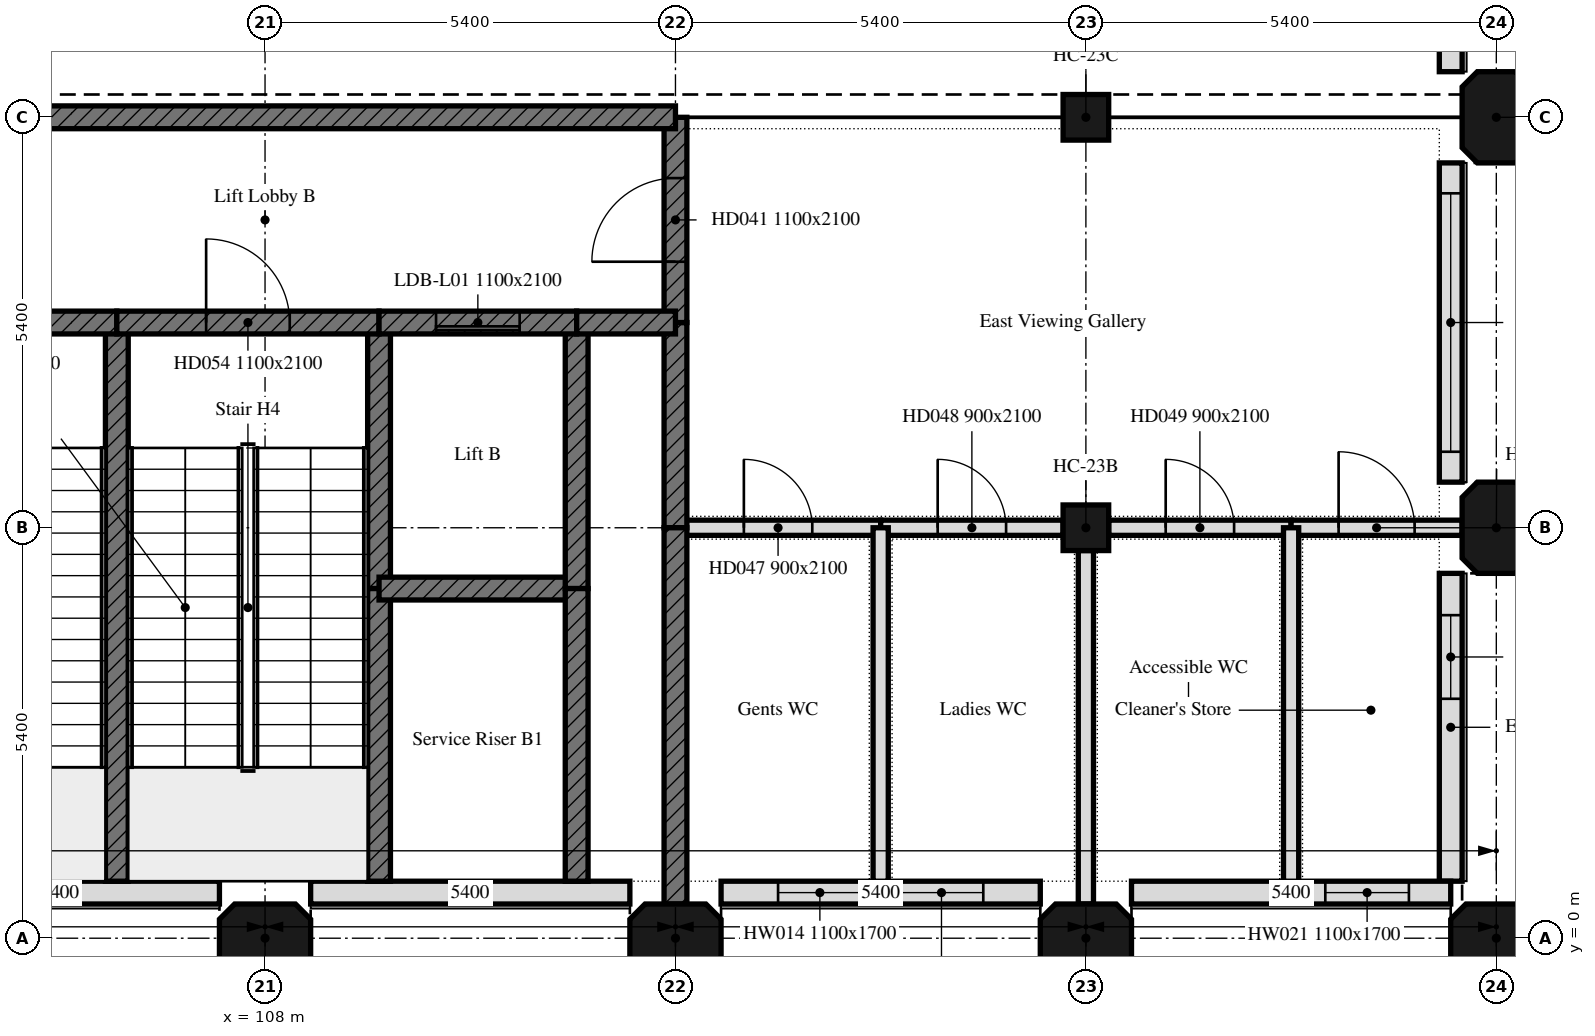
"""IFC4 building model, lengths in metres.
Left out: names, types, materials, properties, quantities, classifications, styles, units other than length and angle.
Written with IfcOpenShell. Run it as: python <this file> out.ifc"""

import sys

from ifc_helpers import new_model, si_unit, direction, frame, frame_2d, origin, origin_2d, place, context, subcontext, project, spatial, polyline, rectangle, outline, extrude, element, fill, save


model = new_model("IFC4")
c1 = context("Model", 3, precision=1e-05, world=origin(), true_north=direction((0.0, 1.0)))
c2 = subcontext(c1, "Body", "Model", "MODEL_VIEW")
j1 = project(units=[si_unit("LENGTHUNIT", "METRE"), si_unit("PLANEANGLEUNIT", "RADIAN")], contexts=[c1])
p1 = place(None, origin())
s1 = spatial("IfcSite", under=j1, at=p1, CompositionType="ELEMENT")
p2 = place(p1, origin())
s2 = spatial("IfcBuilding", under=s1, at=p2, CompositionType="ELEMENT")
p3 = place(p2, frame((0.0, 0.0, 8.4)))
s3 = spatial("IfcBuildingStorey", under=s2, at=p3, CompositionType="ELEMENT", Elevation=8.4)
for number, where, z_axis, x_axis in (
    (1, (108.0, 0.0, 0.0), (0.0, 0.0, 1.0), (1.0, 0.0, 0.0)),
    (2, (113.4, 0.0, 0.0), (0.0, 0.0, 1.0), (1.0, 0.0, 0.0)),
    (3, (118.8, 0.0, 0.0), (0.0, 0.0, 1.0), (1.0, 0.0, 0.0)),
):
    element("IfcColumn", number, at=place(p3, frame(where, z_axis=z_axis, x_axis=x_axis)), inside=s3, PredefinedType="COLUMN", context=c2, shape_type="SweptSolid", body=[
        extrude(outline(polyline([(-0.4, -0.45), (0.4, -0.45), (0.6, -0.25), (0.6, 0.25), (0.4, 0.45), (-0.4, 0.45), (-0.6, 0.25), (-0.6, -0.25), (-0.4, -0.45)])), origin(), (0.0, 0.0, 1.0), 5.7),
    ])
for number, where, z_axis, x_axis in (
    (4, (118.8, 5.4, 0.0), (0.0, 0.0, 1.0), (1.0, 0.0, 0.0)),
    (5, (118.8, 10.8, 0.0), (0.0, 0.0, 1.0), (1.0, 0.0, 0.0)),
):
    element("IfcColumn", number, at=place(p3, frame(where, z_axis=z_axis, x_axis=x_axis)), inside=s3, PredefinedType="COLUMN", context=c2, shape_type="SweptSolid", body=[
        extrude(rectangle(XDim=0.6, YDim=0.6, at=origin_2d()), origin(), (0.0, 0.0, 1.0), 5.7),
    ])
for number, where, z_axis, x_axis in (
    (6, (124.2, 0.0, 0.0), (0.0, 0.0, 1.0), (1.0, 0.0, 0.0)),
    (7, (124.2, 5.4, 0.0), (0.0, 0.0, 1.0), (0.0, 1.0, 0.0)),
    (8, (124.2, 10.8, 0.0), (0.0, 0.0, 1.0), (0.0, 1.0, 0.0)),
):
    element("IfcColumn", number, at=place(p3, frame(where, z_axis=z_axis, x_axis=x_axis)), inside=s3, PredefinedType="COLUMN", context=c2, shape_type="SweptSolid", body=[
        extrude(outline(polyline([(-0.4, -0.45), (0.4, -0.45), (0.6, -0.25), (0.6, 0.25), (0.4, 0.45), (-0.4, 0.45), (-0.6, 0.25), (-0.6, -0.25), (-0.4, -0.45)])), origin(), (0.0, 0.0, 1.0), 5.7),
    ])
for number, where, z_axis, x_axis in (
    (9, (103.2, 0.6, 0.0), (0.0, 0.0, 1.0), (1.0, 0.0, 0.0)),
    (10, (108.6, 0.6, 0.0), (0.0, 0.0, 1.0), (1.0, 0.0, 0.0)),
):
    element("IfcWall", number, at=place(p3, frame(where, z_axis=z_axis, x_axis=x_axis)), inside=s3, PredefinedType="SOLIDWALL", context=c2, shape_type="SweptSolid", body=[
        extrude(rectangle(XDim=4.2, YDim=0.3, at=frame_2d((2.1, 0.0))), origin(), (0.0, 0.0, 1.0), 5.7),
    ])
p4 = place(p3, frame((114.0, 0.6, 0.0), z_axis=(0.0, 0.0, 1.0), x_axis=(1.0, 0.0, 0.0)))
e11 = element("IfcWall", 11, at=p4, inside=s3, PredefinedType="SOLIDWALL", context=c2, shape_type="SweptSolid", body=[
    extrude(rectangle(XDim=4.2, YDim=0.3, at=frame_2d((2.1, 0.0))), origin(), (0.0, 0.0, 1.0), 5.7),
])
p5 = place(p4, frame((0.75, 0.0, 0.9)))
e12 = element("IfcOpeningElement", 12, at=p5, cuts=e11, PredefinedType="OPENING", context=c2, shape_type="SweptSolid", body=[
    extrude(rectangle(XDim=1.1, YDim=1.7, at=frame_2d((0.55, 0.85))), frame((0.0, 0.15, 0.0), z_axis=(0.0, -1.0, 0.0), x_axis=(1.0, 0.0, 0.0)), (0.0, 0.0, 1.0), 0.3),
])
p6 = place(p4, frame((2.35, 0.0, 0.9)))
e13 = element("IfcOpeningElement", 13, at=p6, cuts=e11, PredefinedType="OPENING", context=c2, shape_type="SweptSolid", body=[
    extrude(rectangle(XDim=1.1, YDim=1.7, at=frame_2d((0.55, 0.85))), frame((0.0, 0.15, 0.0), z_axis=(0.0, -1.0, 0.0), x_axis=(1.0, 0.0, 0.0)), (0.0, 0.0, 1.0), 0.3),
])
p7 = place(p3, frame((119.4, 0.6, 0.0), z_axis=(0.0, 0.0, 1.0), x_axis=(1.0, 0.0, 0.0)))
e14 = element("IfcWall", 14, at=p7, inside=s3, PredefinedType="SOLIDWALL", context=c2, shape_type="SweptSolid", body=[
    extrude(rectangle(XDim=4.2, YDim=0.3, at=frame_2d((2.1, 0.0))), origin(), (0.0, 0.0, 1.0), 5.7),
])
p8 = place(p7, frame((2.55, 0.0, 0.9)))
e15 = element("IfcOpeningElement", 15, at=p8, cuts=e14, PredefinedType="OPENING", context=c2, shape_type="SweptSolid", body=[
    extrude(rectangle(XDim=1.1, YDim=1.7, at=frame_2d((0.55, 0.85))), frame((0.0, 0.15, 0.0), z_axis=(0.0, -1.0, 0.0), x_axis=(1.0, 0.0, 0.0)), (0.0, 0.0, 1.0), 0.3),
])
p9 = place(p3, frame((123.6, 0.75, 0.0), z_axis=(0.0, 0.0, 1.0), x_axis=(0.0, 1.0, 0.0)))
e16 = element("IfcWall", 16, at=p9, inside=s3, PredefinedType="SOLIDWALL", context=c2, shape_type="SweptSolid", body=[
    extrude(rectangle(XDim=4.05, YDim=0.3, at=frame_2d((2.025, 0.0))), origin(), (0.0, 0.0, 1.0), 5.7),
])
p10 = place(p9, frame((2.4, 0.0, 0.9)))
e17 = element("IfcOpeningElement", 17, at=p10, cuts=e16, PredefinedType="OPENING", context=c2, shape_type="SweptSolid", body=[
    extrude(rectangle(XDim=1.1, YDim=1.7, at=frame_2d((0.55, 0.85))), frame((0.0, 0.15, 0.0), z_axis=(0.0, -1.0, 0.0), x_axis=(1.0, 0.0, 0.0)), (0.0, 0.0, 1.0), 0.3),
])
p11 = place(p3, frame((123.6, 6.0, 0.0), z_axis=(0.0, 0.0, 1.0), x_axis=(0.0, 1.0, 0.0)))
e18 = element("IfcWall", 18, at=p11, inside=s3, PredefinedType="SOLIDWALL", context=c2, shape_type="SweptSolid", body=[
    extrude(rectangle(XDim=4.2, YDim=0.3, at=frame_2d((2.1, 0.0))), origin(), (0.0, 0.0, 1.0), 5.7),
])
p12 = place(p11, frame((0.4, 0.0, 0.9)))
e19 = element("IfcOpeningElement", 19, at=p12, cuts=e18, PredefinedType="OPENING", context=c2, shape_type="SweptSolid", body=[
    extrude(rectangle(XDim=3.4, YDim=1.7, at=frame_2d((1.7, 0.85))), frame((0.0, 0.15, 0.0), z_axis=(0.0, -1.0, 0.0), x_axis=(1.0, 0.0, 0.0)), (0.0, 0.0, 1.0), 0.3),
])
p13 = place(p3, frame((123.6, 11.4, 0.0), z_axis=(0.0, 0.0, 1.0), x_axis=(0.0, 1.0, 0.0)))
e20 = element("IfcWall", 20, at=p13, inside=s3, PredefinedType="SOLIDWALL", context=c2, shape_type="SweptSolid", body=[
    extrude(rectangle(XDim=4.2, YDim=0.3, at=frame_2d((2.1, 0.0))), origin(), (0.0, 0.0, 1.0), 6.0),
])
p14 = place(p3, frame((113.4, 5.4, 0.0), z_axis=(0.0, 0.0, 1.0), x_axis=(1.0, 0.0, 0.0)))
e21 = element("IfcWall", 21, at=p14, inside=s3, PredefinedType="PARTITIONING", context=c2, shape_type="SweptSolid", body=[
    extrude(rectangle(XDim=2.7, YDim=0.2, at=frame_2d((1.35, 0.0))), origin(), (0.0, 0.0, 1.0), 5.7),
])
p15 = place(p14, frame((0.9, 0.0, 0.0)))
e22 = element("IfcOpeningElement", 22, at=p15, cuts=e21, PredefinedType="OPENING", context=c2, shape_type="SweptSolid", body=[
    extrude(rectangle(XDim=0.9, YDim=2.1, at=frame_2d((0.45, 1.05))), frame((0.0, 0.1, 0.0), z_axis=(0.0, -1.0, 0.0), x_axis=(1.0, 0.0, 0.0)), (0.0, 0.0, 1.0), 0.2),
])
p16 = place(p3, frame((116.1, 5.4, 0.0), z_axis=(0.0, 0.0, 1.0), x_axis=(1.0, 0.0, 0.0)))
e23 = element("IfcWall", 23, at=p16, inside=s3, PredefinedType="PARTITIONING", context=c2, shape_type="SweptSolid", body=[
    extrude(rectangle(XDim=2.4, YDim=0.2, at=frame_2d((1.2, 0.0))), origin(), (0.0, 0.0, 1.0), 5.7),
])
p17 = place(p16, frame((0.75, 0.0, 0.0)))
e24 = element("IfcOpeningElement", 24, at=p17, cuts=e23, PredefinedType="OPENING", context=c2, shape_type="SweptSolid", body=[
    extrude(rectangle(XDim=0.9, YDim=2.1, at=frame_2d((0.45, 1.05))), frame((0.0, 0.1, 0.0), z_axis=(0.0, -1.0, 0.0), x_axis=(1.0, 0.0, 0.0)), (0.0, 0.0, 1.0), 0.2),
])
p18 = place(p3, frame((119.1, 5.4, 0.0), z_axis=(0.0, 0.0, 1.0), x_axis=(1.0, 0.0, 0.0)))
e25 = element("IfcWall", 25, at=p18, inside=s3, PredefinedType="PARTITIONING", context=c2, shape_type="SweptSolid", body=[
    extrude(rectangle(XDim=2.4, YDim=0.2, at=frame_2d((1.2, 0.0))), origin(), (0.0, 0.0, 1.0), 5.7),
])
p19 = place(p18, frame((0.75, 0.0, 0.0)))
e26 = element("IfcOpeningElement", 26, at=p19, cuts=e25, PredefinedType="OPENING", context=c2, shape_type="SweptSolid", body=[
    extrude(rectangle(XDim=0.9, YDim=2.1, at=frame_2d((0.45, 1.05))), frame((0.0, 0.1, 0.0), z_axis=(0.0, -1.0, 0.0), x_axis=(1.0, 0.0, 0.0)), (0.0, 0.0, 1.0), 0.2),
])
p20 = place(p3, frame((121.5, 5.4, 0.0), z_axis=(0.0, 0.0, 1.0), x_axis=(1.0, 0.0, 0.0)))
e27 = element("IfcWall", 27, at=p20, inside=s3, PredefinedType="PARTITIONING", context=c2, shape_type="SweptSolid", body=[
    extrude(rectangle(XDim=2.25, YDim=0.2, at=frame_2d((1.125, 0.0))), origin(), (0.0, 0.0, 1.0), 5.7),
])
p21 = place(p20, frame((0.625, 0.0, 0.0)))
e28 = element("IfcOpeningElement", 28, at=p21, cuts=e27, PredefinedType="OPENING", context=c2, shape_type="SweptSolid", body=[
    extrude(rectangle(XDim=1.0, YDim=2.1, at=frame_2d((0.5, 1.05))), frame((0.0, 0.1, 0.0), z_axis=(0.0, -1.0, 0.0), x_axis=(1.0, 0.0, 0.0)), (0.0, 0.0, 1.0), 0.2),
])
p22 = place(p3, frame((113.4, 5.4, 0.0), z_axis=(0.0, 0.0, 1.0), x_axis=(0.0, 1.0, 0.0)))
e29 = element("IfcWall", 29, at=p22, inside=s3, PredefinedType="SHEAR", context=c2, shape_type="SweptSolid", body=[
    extrude(rectangle(XDim=2.7, YDim=0.3, at=frame_2d((1.35, 0.0))), origin(), (0.0, 0.0, 1.0), 5.7),
])
p23 = place(p3, frame((113.4, 8.1, 0.0), z_axis=(0.0, 0.0, 1.0), x_axis=(0.0, 1.0, 0.0)))
e30 = element("IfcWall", 30, at=p23, inside=s3, PredefinedType="SHEAR", context=c2, shape_type="SweptSolid", body=[
    extrude(rectangle(XDim=2.7, YDim=0.3, at=frame_2d((1.35, 0.0))), origin(), (0.0, 0.0, 1.0), 5.7),
])
p24 = place(p23, frame((0.8, 0.0, 0.0)))
e31 = element("IfcOpeningElement", 31, at=p24, cuts=e30, PredefinedType="OPENING", context=c2, shape_type="SweptSolid", body=[
    extrude(rectangle(XDim=1.1, YDim=2.1, at=frame_2d((0.55, 1.05))), frame((0.0, 0.15, 0.0), z_axis=(0.0, -1.0, 0.0), x_axis=(1.0, 0.0, 0.0)), (0.0, 0.0, 1.0), 0.3),
])
p25 = place(p3, frame((116.1, 0.75, 0.0), z_axis=(0.0, 0.0, 1.0), x_axis=(0.0, 1.0, 0.0)))
e32 = element("IfcWall", 32, at=p25, inside=s3, PredefinedType="PARTITIONING", context=c2, shape_type="SweptSolid", body=[
    extrude(rectangle(XDim=4.65, YDim=0.2, at=frame_2d((2.325, 0.0))), origin(), (0.0, 0.0, 1.0), 5.7),
])
p26 = place(p3, frame((113.4, 0.45, 0.0), z_axis=(0.0, 0.0, 1.0), x_axis=(0.0, 1.0, 0.0)))
e33 = element("IfcWall", 33, at=p26, inside=s3, PredefinedType="SHEAR", context=c2, shape_type="SweptSolid", body=[
    extrude(rectangle(XDim=4.95, YDim=0.3, at=frame_2d((2.475, 0.0))), origin(), (0.0, 0.0, 1.0), 5.7),
])
p27 = place(p3, frame((118.8, 0.45, 0.0), z_axis=(0.0, 0.0, 1.0), x_axis=(0.0, 1.0, 0.0)))
e34 = element("IfcWall", 34, at=p27, inside=s3, PredefinedType="PARTITIONING", context=c2, shape_type="SweptSolid", body=[
    extrude(rectangle(XDim=4.65, YDim=0.2, at=frame_2d((2.325, 0.0))), origin(), (0.0, 0.0, 1.0), 5.7),
])
p28 = place(p3, frame((121.5, 0.75, 0.0), z_axis=(0.0, 0.0, 1.0), x_axis=(0.0, 1.0, 0.0)))
e35 = element("IfcWall", 35, at=p28, inside=s3, PredefinedType="PARTITIONING", context=c2, shape_type="SweptSolid", body=[
    extrude(rectangle(XDim=4.65, YDim=0.2, at=frame_2d((2.325, 0.0))), origin(), (0.0, 0.0, 1.0), 5.7),
])
p29 = place(p3, frame((106.05, 0.75, 0.0), z_axis=(0.0, 0.0, 1.0), x_axis=(0.0, 1.0, 0.0)))
e36 = element("IfcWall", 36, at=p29, inside=s3, PredefinedType="SHEAR", context=c2, shape_type="SweptSolid", body=[
    extrude(rectangle(XDim=7.35, YDim=0.3, at=frame_2d((3.675, 0.0))), origin(), (0.0, 0.0, 1.0), 5.7),
])
p30 = place(p3, frame((102.6, 8.1, 0.0), z_axis=(0.0, 0.0, 1.0), x_axis=(1.0, 0.0, 0.0)))
e37 = element("IfcWall", 37, at=p30, inside=s3, PredefinedType="SHEAR", context=c2, shape_type="SweptSolid", body=[
    extrude(rectangle(XDim=3.45, YDim=0.3, at=frame_2d((1.725, 0.0))), origin(), (0.0, 0.0, 1.0), 5.7),
])
p31 = place(p30, frame((1.175, 0.0, 0.0)))
e38 = element("IfcOpeningElement", 38, at=p31, cuts=e37, PredefinedType="OPENING", context=c2, shape_type="SweptSolid", body=[
    extrude(rectangle(XDim=1.1, YDim=2.1, at=frame_2d((0.55, 1.05))), frame((0.0, 0.15, 0.0), z_axis=(0.0, -1.0, 0.0), x_axis=(1.0, 0.0, 0.0)), (0.0, 0.0, 1.0), 0.3),
])
p32 = place(p3, frame((109.5, 4.6, 0.0), z_axis=(0.0, 0.0, 1.0), x_axis=(0.0, 1.0, 0.0)))
e39 = element("IfcWall", 39, at=p32, inside=s3, PredefinedType="SHEAR", context=c2, shape_type="SweptSolid", body=[
    extrude(rectangle(XDim=3.5, YDim=0.3, at=frame_2d((1.75, 0.0))), origin(), (0.0, 0.0, 1.0), 5.7),
])
p33 = place(p3, frame((109.5, 0.75, 0.0), z_axis=(0.0, 0.0, 1.0), x_axis=(0.0, 1.0, 0.0)))
e40 = element("IfcWall", 40, at=p33, inside=s3, PredefinedType="SHEAR", context=c2, shape_type="SweptSolid", body=[
    extrude(rectangle(XDim=3.85, YDim=0.3, at=frame_2d((1.925, 0.0))), origin(), (0.0, 0.0, 1.0), 5.7),
])
p34 = place(p3, frame((106.05, 8.1, 0.0), z_axis=(0.0, 0.0, 1.0), x_axis=(1.0, 0.0, 0.0)))
e41 = element("IfcWall", 41, at=p34, inside=s3, PredefinedType="SHEAR", context=c2, shape_type="SweptSolid", body=[
    extrude(rectangle(XDim=3.45, YDim=0.3, at=frame_2d((1.725, 0.0))), origin(), (0.0, 0.0, 1.0), 5.7),
])
p35 = place(p34, frame((1.175, 0.0, 0.0)))
e42 = element("IfcOpeningElement", 42, at=p35, cuts=e41, PredefinedType="OPENING", context=c2, shape_type="SweptSolid", body=[
    extrude(rectangle(XDim=1.1, YDim=2.1, at=frame_2d((0.55, 1.05))), frame((0.0, 0.15, 0.0), z_axis=(0.0, -1.0, 0.0), x_axis=(1.0, 0.0, 0.0)), (0.0, 0.0, 1.0), 0.3),
])
p36 = place(p3, frame((109.5, 4.6, 0.0), z_axis=(0.0, 0.0, 1.0), x_axis=(1.0, 0.0, 0.0)))
e43 = element("IfcWall", 43, at=p36, inside=s3, PredefinedType="SHEAR", context=c2, shape_type="SweptSolid", body=[
    extrude(rectangle(XDim=2.6, YDim=0.3, at=frame_2d((1.3, 0.0))), origin(), (0.0, 0.0, 1.0), 5.7),
])
p37 = place(p3, frame((112.1, 4.6, 0.0), z_axis=(0.0, 0.0, 1.0), x_axis=(0.0, 1.0, 0.0)))
e44 = element("IfcWall", 44, at=p37, inside=s3, PredefinedType="SHEAR", context=c2, shape_type="SweptSolid", body=[
    extrude(rectangle(XDim=3.5, YDim=0.3, at=frame_2d((1.75, 0.0))), origin(), (0.0, 0.0, 1.0), 5.7),
])
p38 = place(p3, frame((109.5, 8.1, 0.0), z_axis=(0.0, 0.0, 1.0), x_axis=(1.0, 0.0, 0.0)))
e45 = element("IfcWall", 45, at=p38, inside=s3, PredefinedType="SHEAR", context=c2, shape_type="SweptSolid", body=[
    extrude(rectangle(XDim=2.6, YDim=0.3, at=frame_2d((1.3, 0.0))), origin(), (0.0, 0.0, 1.0), 5.7),
])
p39 = place(p38, frame((0.75, 0.0, 0.0)))
e46 = element("IfcOpeningElement", 46, at=p39, cuts=e45, PredefinedType="OPENING", context=c2, shape_type="SweptSolid", body=[
    extrude(rectangle(XDim=1.1, YDim=2.1, at=frame_2d((0.55, 1.05))), frame((0.0, 0.15, 0.0), z_axis=(0.0, -1.0, 0.0), x_axis=(1.0, 0.0, 0.0)), (0.0, 0.0, 1.0), 0.3),
])
p40 = place(p3, frame((112.1, 0.75, 0.0), z_axis=(0.0, 0.0, 1.0), x_axis=(0.0, 1.0, 0.0)))
e47 = element("IfcWall", 47, at=p40, inside=s3, PredefinedType="SHEAR", context=c2, shape_type="SweptSolid", body=[
    extrude(rectangle(XDim=3.85, YDim=0.3, at=frame_2d((1.925, 0.0))), origin(), (0.0, 0.0, 1.0), 5.7),
])
p41 = place(p3, frame((112.1, 8.1, 0.0), z_axis=(0.0, 0.0, 1.0), x_axis=(1.0, 0.0, 0.0)))
e48 = element("IfcWall", 48, at=p41, inside=s3, PredefinedType="SHEAR", context=c2, shape_type="SweptSolid", body=[
    extrude(rectangle(XDim=1.3, YDim=0.3, at=frame_2d((0.65, 0.0))), origin(), (0.0, 0.0, 1.0), 5.7),
])
p42 = place(p3, frame((102.6, 10.8, 0.0), z_axis=(0.0, 0.0, 1.0), x_axis=(1.0, 0.0, 0.0)))
e49 = element("IfcWall", 49, at=p42, inside=s3, PredefinedType="SHEAR", context=c2, shape_type="SweptSolid", body=[
    extrude(rectangle(XDim=10.8, YDim=0.3, at=frame_2d((5.4, 0.0))), origin(), (0.0, 0.0, 1.0), 5.7),
])
p43 = place(p5, origin())
e50 = element("IfcWindow", 50, at=p43, inside=s3, PartitioningType="SINGLE_PANEL", PredefinedType="WINDOW", context=c2, shape_type="SweptSolid", body=[
    extrude(rectangle(XDim=1.1, YDim=1.7, at=frame_2d((0.55, 0.85))), frame((0.0, 0.03, 0.0), z_axis=(0.0, -1.0, 0.0), x_axis=(1.0, 0.0, 0.0)), (0.0, 0.0, 1.0), 0.06),
])
fill(e12, e50)
p44 = place(p6, origin())
e51 = element("IfcWindow", 51, at=p44, inside=s3, PartitioningType="SINGLE_PANEL", PredefinedType="WINDOW", context=c2, shape_type="SweptSolid", body=[
    extrude(rectangle(XDim=1.1, YDim=1.7, at=frame_2d((0.55, 0.85))), frame((0.0, 0.03, 0.0), z_axis=(0.0, -1.0, 0.0), x_axis=(1.0, 0.0, 0.0)), (0.0, 0.0, 1.0), 0.06),
])
fill(e13, e51)
p45 = place(p8, origin())
e52 = element("IfcWindow", 52, at=p45, inside=s3, PartitioningType="SINGLE_PANEL", PredefinedType="WINDOW", context=c2, shape_type="SweptSolid", body=[
    extrude(rectangle(XDim=1.1, YDim=1.7, at=frame_2d((0.55, 0.85))), frame((0.0, 0.03, 0.0), z_axis=(0.0, -1.0, 0.0), x_axis=(1.0, 0.0, 0.0)), (0.0, 0.0, 1.0), 0.06),
])
fill(e15, e52)
p46 = place(p10, origin())
e53 = element("IfcWindow", 53, at=p46, inside=s3, PartitioningType="SINGLE_PANEL", PredefinedType="WINDOW", context=c2, shape_type="SweptSolid", body=[
    extrude(rectangle(XDim=1.1, YDim=1.7, at=frame_2d((0.55, 0.85))), frame((0.0, 0.03, 0.0), z_axis=(0.0, -1.0, 0.0), x_axis=(1.0, 0.0, 0.0)), (0.0, 0.0, 1.0), 0.06),
])
fill(e17, e53)
p47 = place(p12, origin())
e54 = element("IfcWindow", 54, at=p47, inside=s3, PartitioningType="SINGLE_PANEL", PredefinedType="WINDOW", context=c2, shape_type="SweptSolid", body=[
    extrude(rectangle(XDim=3.4, YDim=1.7, at=frame_2d((1.7, 0.85))), frame((0.0, 0.03, 0.0), z_axis=(0.0, -1.0, 0.0), x_axis=(1.0, 0.0, 0.0)), (0.0, 0.0, 1.0), 0.06),
])
fill(e19, e54)
p48 = place(p24, origin())
e55 = element("IfcDoor", 55, at=p48, inside=s3, OperationType="SINGLE_SWING_LEFT", PredefinedType="DOOR", context=c2, shape_type="SweptSolid", body=[
    extrude(rectangle(XDim=1.1, YDim=2.1, at=frame_2d((0.55, 1.05))), frame((0.0, 0.025, 0.0), z_axis=(0.0, -1.0, 0.0), x_axis=(1.0, 0.0, 0.0)), (0.0, 0.0, 1.0), 0.05),
])
fill(e31, e55)
p49 = place(p15, origin())
e56 = element("IfcDoor", 56, at=p49, inside=s3, OperationType="SINGLE_SWING_LEFT", PredefinedType="DOOR", context=c2, shape_type="SweptSolid", body=[
    extrude(rectangle(XDim=0.9, YDim=2.1, at=frame_2d((0.45, 1.05))), frame((0.0, 0.025, 0.0), z_axis=(0.0, -1.0, 0.0), x_axis=(1.0, 0.0, 0.0)), (0.0, 0.0, 1.0), 0.05),
])
fill(e22, e56)
p50 = place(p17, origin())
e57 = element("IfcDoor", 57, at=p50, inside=s3, OperationType="SINGLE_SWING_LEFT", PredefinedType="DOOR", context=c2, shape_type="SweptSolid", body=[
    extrude(rectangle(XDim=0.9, YDim=2.1, at=frame_2d((0.45, 1.05))), frame((0.0, 0.025, 0.0), z_axis=(0.0, -1.0, 0.0), x_axis=(1.0, 0.0, 0.0)), (0.0, 0.0, 1.0), 0.05),
])
fill(e24, e57)
p51 = place(p19, origin())
e58 = element("IfcDoor", 58, at=p51, inside=s3, OperationType="SINGLE_SWING_LEFT", PredefinedType="DOOR", context=c2, shape_type="SweptSolid", body=[
    extrude(rectangle(XDim=0.9, YDim=2.1, at=frame_2d((0.45, 1.05))), frame((0.0, 0.025, 0.0), z_axis=(0.0, -1.0, 0.0), x_axis=(1.0, 0.0, 0.0)), (0.0, 0.0, 1.0), 0.05),
])
fill(e26, e58)
p52 = place(p21, origin())
e59 = element("IfcDoor", 59, at=p52, inside=s3, OperationType="SINGLE_SWING_LEFT", PredefinedType="DOOR", context=c2, shape_type="SweptSolid", body=[
    extrude(rectangle(XDim=1.0, YDim=2.1, at=frame_2d((0.5, 1.05))), frame((0.0, 0.025, 0.0), z_axis=(0.0, -1.0, 0.0), x_axis=(1.0, 0.0, 0.0)), (0.0, 0.0, 1.0), 0.05),
])
fill(e28, e59)
p53 = place(p35, origin())
e60 = element("IfcDoor", 60, at=p53, inside=s3, OperationType="SINGLE_SWING_LEFT", PredefinedType="DOOR", context=c2, shape_type="SweptSolid", body=[
    extrude(rectangle(XDim=1.1, YDim=2.1, at=frame_2d((0.55, 1.05))), frame((0.0, 0.025, 0.0), z_axis=(0.0, -1.0, 0.0), x_axis=(1.0, 0.0, 0.0)), (0.0, 0.0, 1.0), 0.05),
])
fill(e42, e60)
p54 = place(p39, origin())
e61 = element("IfcDoor", 61, at=p54, inside=s3, OperationType="SLIDING_TO_LEFT", PredefinedType="DOOR", context=c2, shape_type="SweptSolid", body=[
    extrude(rectangle(XDim=1.1, YDim=2.1, at=frame_2d((0.55, 1.05))), frame((0.0, 0.025, 0.0), z_axis=(0.0, -1.0, 0.0), x_axis=(1.0, 0.0, 0.0)), (0.0, 0.0, 1.0), 0.05),
])
fill(e46, e61)
save(model, sys.argv[1])
